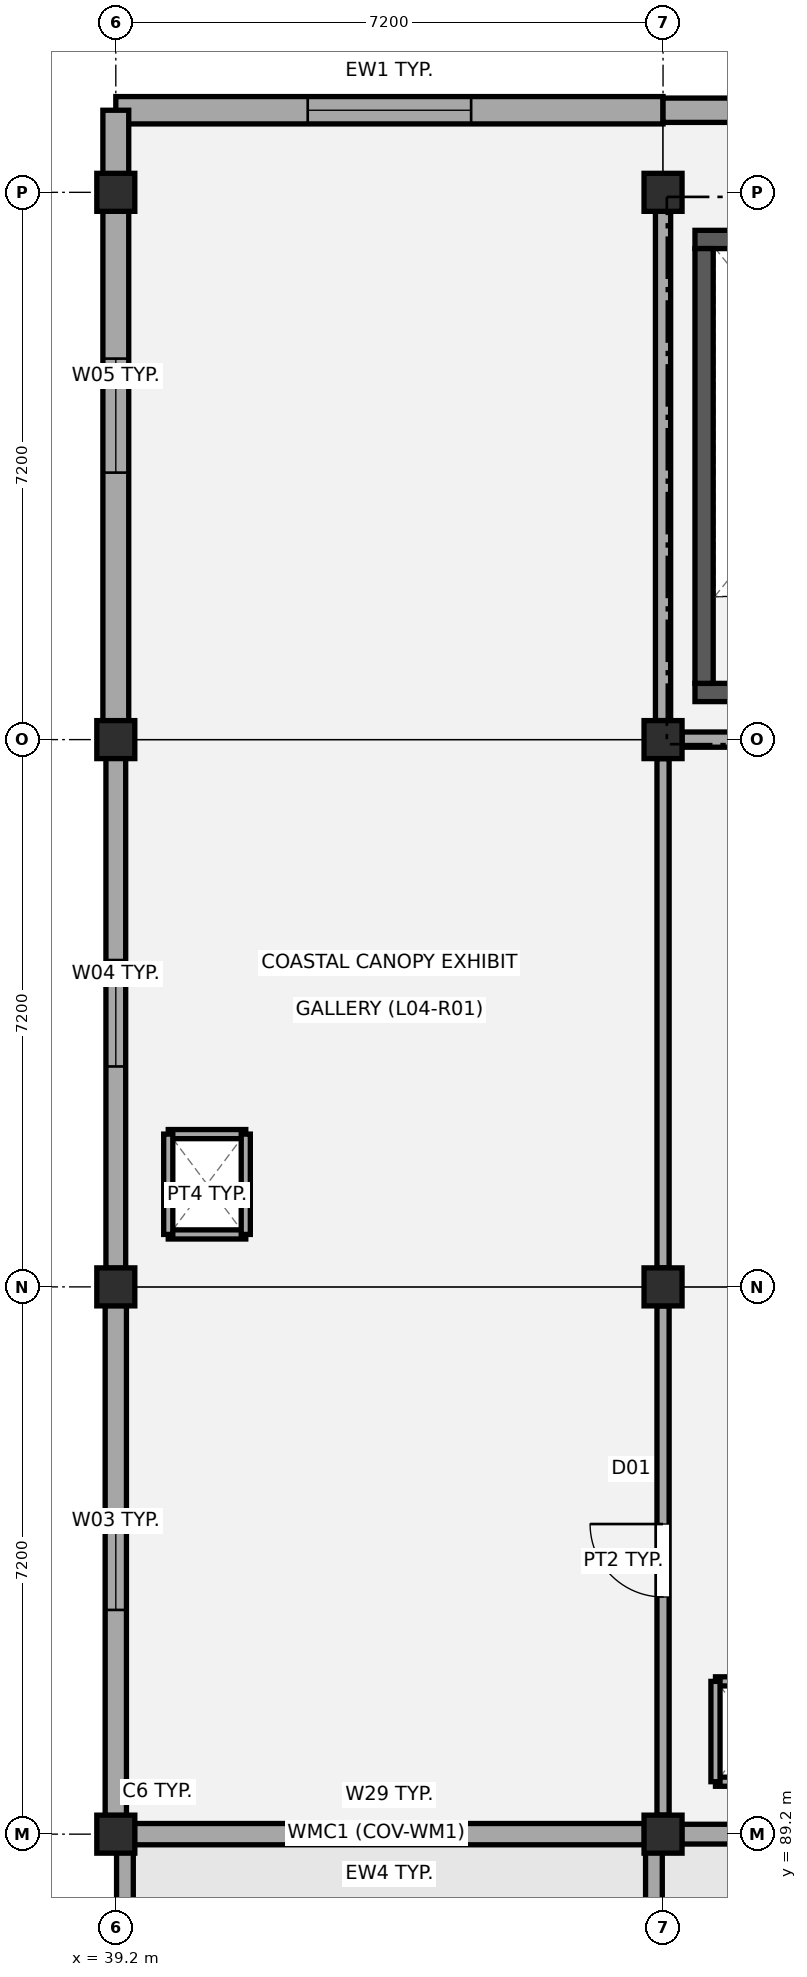
"""IFC4 building model, lengths in metres.
Left out: names, types, materials, properties, quantities, classifications, styles, units other than length and angle.
Written with IfcOpenShell. Run it as: python <this file> out.ifc"""

import sys

from ifc_helpers import new_model, si_unit, direction, frame, frame_2d, origin, origin_2d, place, context, subcontext, project, spatial, rectangle, extrude, element, fill, save


model = new_model("IFC4")
c1 = context("Model", 3, precision=1e-05, world=origin(), true_north=direction((0.0, 1.0)))
c2 = subcontext(c1, "Body", "Model", "MODEL_VIEW")
j1 = project(units=[si_unit("LENGTHUNIT", "METRE"), si_unit("PLANEANGLEUNIT", "RADIAN")], contexts=[c1])
p1 = place(None, origin())
s1 = spatial("IfcSite", under=j1, at=p1, CompositionType="ELEMENT")
p2 = place(p1, origin())
s2 = spatial("IfcBuilding", under=s1, at=p2, CompositionType="ELEMENT")
p3 = place(p2, frame((0.0, 0.0, 17.64)))
s3 = spatial("IfcBuildingStorey", under=s2, at=p3, CompositionType="ELEMENT", Elevation=17.64)
for number, where, z_axis, x_axis in (
    (1, (39.2, 89.2, 0.0), (0.0, 0.0, 1.0), (1.0, 0.0, 0.0)),
    (2, (39.2, 96.4, 0.0), (0.0, 0.0, 1.0), (1.0, 0.0, 0.0)),
    (3, (39.2, 103.6, 0.0), (0.0, 0.0, 1.0), (1.0, 0.0, 0.0)),
    (4, (39.2, 110.8, 0.0), (0.0, 0.0, 1.0), (1.0, 0.0, 0.0)),
    (5, (46.4, 89.2, 0.0), (0.0, 0.0, 1.0), (1.0, 0.0, 0.0)),
    (6, (46.4, 96.4, 0.0), (0.0, 0.0, 1.0), (1.0, 0.0, 0.0)),
    (7, (46.4, 103.6, 0.0), (0.0, 0.0, 1.0), (1.0, 0.0, 0.0)),
    (8, (46.4, 110.8, 0.0), (0.0, 0.0, 1.0), (1.0, 0.0, 0.0)),
):
    element("IfcColumn", number, at=place(p3, frame(where, z_axis=z_axis, x_axis=x_axis)), inside=s3, PredefinedType="COLUMN", context=c2, shape_type="SweptSolid", body=[
        extrude(rectangle(XDim=0.5, YDim=0.5, at=origin_2d()), origin(), (0.0, 0.0, 1.0), 3.96),
    ])
p4 = place(p3, frame((46.155, 89.2, 0.0), z_axis=(0.0, 0.0, 1.0), x_axis=(-1.0, 0.0, 0.0)))
e9 = element("IfcWall", 9, at=p4, inside=s3, PredefinedType="STANDARD", context=c2, shape_type="SweptSolid", body=[
    extrude(rectangle(XDim=6.71, YDim=0.28, at=frame_2d((3.355, 0.0))), origin(), (0.0, 0.0, 1.0), 3.08),
])
p5 = place(p4, frame((2.38, 0.0, 0.95)))
e10 = element("IfcOpeningElement", 10, at=p5, cuts=e9, PredefinedType="OPENING", context=c2, shape_type="SweptSolid", body=[
    extrude(rectangle(XDim=1.95, YDim=1.35, at=frame_2d((0.975, 0.675))), frame((0.0, 0.15, 0.0), z_axis=(0.0, -1.0, 0.0), x_axis=(1.0, 0.0, 0.0)), (0.0, 0.0, 1.0), 0.3),
])
p6 = place(p3, frame((39.2, 111.88, 0.0), z_axis=(0.0, 0.0, 1.0), x_axis=(1.0, 0.0, 0.0)))
e11 = element("IfcWall", 11, at=p6, inside=s3, PredefinedType="STANDARD", context=c2, shape_type="SweptSolid", body=[
    extrude(rectangle(XDim=7.2, YDim=0.36, at=frame_2d((3.6, 0.0))), origin(), (0.0, 0.0, 1.0), 3.63),
])
p7 = place(p6, frame((2.525, 0.0, 0.95)))
e12 = element("IfcOpeningElement", 12, at=p7, cuts=e11, PredefinedType="OPENING", context=c2, shape_type="SweptSolid", body=[
    extrude(rectangle(XDim=2.15, YDim=1.4, at=frame_2d((1.075, 0.7))), frame((0.0, 0.19, 0.0), z_axis=(0.0, -1.0, 0.0), x_axis=(1.0, 0.0, 0.0)), (0.0, 0.0, 1.0), 0.38),
])
p8 = place(p3, frame((53.355, 89.2, 0.0), z_axis=(0.0, 0.0, 1.0), x_axis=(-1.0, 0.0, 0.0)))
e13 = element("IfcWall", 13, at=p8, inside=s3, PredefinedType="STANDARD", context=c2, shape_type="SweptSolid", body=[
    extrude(rectangle(XDim=6.71, YDim=0.26, at=frame_2d((3.355, 0.0))), origin(), (0.0, 0.0, 1.0), 3.08),
])
p9 = place(p8, frame((2.18, 0.0, 0.95)))
e14 = element("IfcOpeningElement", 14, at=p9, cuts=e13, PredefinedType="OPENING", context=c2, shape_type="SweptSolid", body=[
    extrude(rectangle(XDim=2.35, YDim=1.45, at=frame_2d((1.175, 0.725))), frame((0.0, 0.14, 0.0), z_axis=(0.0, -1.0, 0.0), x_axis=(1.0, 0.0, 0.0)), (0.0, 0.0, 1.0), 0.28),
])
p10 = place(p3, frame((46.4, 111.88, 0.0), z_axis=(0.0, 0.0, 1.0), x_axis=(1.0, 0.0, 0.0)))
e15 = element("IfcWall", 15, at=p10, inside=s3, PredefinedType="STANDARD", context=c2, shape_type="SweptSolid", body=[
    extrude(rectangle(XDim=7.2, YDim=0.32, at=frame_2d((3.6, 0.0))), origin(), (0.0, 0.0, 1.0), 3.63),
])
p11 = place(p3, frame((39.2, 89.445, 0.0), z_axis=(0.0, 0.0, 1.0), x_axis=(0.0, 1.0, 0.0)))
e16 = element("IfcWall", 16, at=p11, inside=s3, PredefinedType="STANDARD", context=c2, shape_type="SweptSolid", body=[
    extrude(rectangle(XDim=6.71, YDim=0.28, at=frame_2d((3.355, 0.0))), origin(), (0.0, 0.0, 1.0), 3.08),
])
p12 = place(p11, frame((2.705, 0.0, 0.95)))
e17 = element("IfcOpeningElement", 17, at=p12, cuts=e16, PredefinedType="OPENING", context=c2, shape_type="SweptSolid", body=[
    extrude(rectangle(XDim=1.3, YDim=1.55, at=frame_2d((0.65, 0.775))), frame((0.0, 0.15, 0.0), z_axis=(0.0, -1.0, 0.0), x_axis=(1.0, 0.0, 0.0)), (0.0, 0.0, 1.0), 0.3),
])
p13 = place(p3, frame((39.2, 96.645, 0.0), z_axis=(0.0, 0.0, 1.0), x_axis=(0.0, 1.0, 0.0)))
e18 = element("IfcWall", 18, at=p13, inside=s3, PredefinedType="STANDARD", context=c2, shape_type="SweptSolid", body=[
    extrude(rectangle(XDim=6.71, YDim=0.26, at=frame_2d((3.355, 0.0))), origin(), (0.0, 0.0, 1.0), 3.08),
])
p14 = place(p13, frame((2.655, 0.0, 0.95)))
e19 = element("IfcOpeningElement", 19, at=p14, cuts=e18, PredefinedType="OPENING", context=c2, shape_type="SweptSolid", body=[
    extrude(rectangle(XDim=1.4, YDim=1.6, at=frame_2d((0.7, 0.8))), frame((0.0, 0.14, 0.0), z_axis=(0.0, -1.0, 0.0), x_axis=(1.0, 0.0, 0.0)), (0.0, 0.0, 1.0), 0.28),
])
p15 = place(p3, frame((39.2, 103.845, 0.0), z_axis=(0.0, 0.0, 1.0), x_axis=(0.0, 1.0, 0.0)))
e20 = element("IfcWall", 20, at=p15, inside=s3, PredefinedType="STANDARD", context=c2, shape_type="SweptSolid", body=[
    extrude(rectangle(XDim=8.035, YDim=0.34, at=frame_2d((4.018, 0.0))), origin(), (0.0, 0.0, 1.0), 3.08),
])
p16 = place(p15, frame((3.268, 0.0, 0.95)))
e21 = element("IfcOpeningElement", 21, at=p16, cuts=e20, PredefinedType="OPENING", context=c2, shape_type="SweptSolid", body=[
    extrude(rectangle(XDim=1.5, YDim=1.65, at=frame_2d((0.75, 0.825))), frame((0.0, 0.18, 0.0), z_axis=(0.0, -1.0, 0.0), x_axis=(1.0, 0.0, 0.0)), (0.0, 0.0, 1.0), 0.36),
])
for number, where, z_axis, x_axis in (
    (22, (39.32, 82.0, 0.0), (0.0, 0.0, 1.0), (0.0, 1.0, 0.0)),
    (23, (46.28, 82.0, 0.0), (0.0, 0.0, 1.0), (0.0, 1.0, 0.0)),
):
    element("IfcWall", number, at=place(p3, frame(where, z_axis=z_axis, x_axis=x_axis)), inside=s3, PredefinedType="PARAPET", context=c2, shape_type="SweptSolid", body=[
        extrude(rectangle(XDim=7.2, YDim=0.22, at=frame_2d((3.6, 0.0))), origin(), (0.0, 0.0, 1.0), 0.72),
    ])
for number, where, z_axis, x_axis in (
    (24, (46.82, 104.22, 0.0), (0.0, 0.0, 1.0), (1.0, 0.0, 0.0)),
    (25, (46.82, 110.18, 0.0), (0.0, 0.0, 1.0), (1.0, 0.0, 0.0)),
):
    element("IfcWall", number, at=place(p3, frame(where, z_axis=z_axis, x_axis=x_axis)), inside=s3, PredefinedType="SHEAR", context=c2, shape_type="SweptSolid", body=[
        extrude(rectangle(XDim=4.24, YDim=0.24, at=frame_2d((2.12, 0.0))), origin(), (0.0, 0.0, 1.0), 3.64),
    ])
p17 = place(p3, frame((46.94, 104.34, 0.0), z_axis=(0.0, 0.0, 1.0), x_axis=(0.0, 1.0, 0.0)))
e26 = element("IfcWall", 26, at=p17, inside=s3, PredefinedType="SHEAR", context=c2, shape_type="SweptSolid", body=[
    extrude(rectangle(XDim=5.72, YDim=0.24, at=frame_2d((2.86, 0.0))), origin(), (0.0, 0.0, 1.0), 3.64),
])
p18 = place(p3, frame((46.4, 103.85, 0.0), z_axis=(0.0, 0.0, 1.0), x_axis=(0.0, 1.0, 0.0)))
e27 = element("IfcWall", 27, at=p18, inside=s3, PredefinedType="PARTITIONING", context=c2, shape_type="SweptSolid", body=[
    extrude(rectangle(XDim=6.7, YDim=0.2, at=frame_2d((3.35, 0.0))), origin(), (0.0, 0.0, 1.0), 2.98),
])
p19 = place(p3, frame((46.65, 103.6, 0.0), z_axis=(0.0, 0.0, 1.0), x_axis=(1.0, 0.0, 0.0)))
e28 = element("IfcWall", 28, at=p19, inside=s3, PredefinedType="PARTITIONING", context=c2, shape_type="SweptSolid", body=[
    extrude(rectangle(XDim=4.29, YDim=0.2, at=frame_2d((2.145, 0.0))), origin(), (0.0, 0.0, 1.0), 2.98),
])
for number, where, z_axis, x_axis in (
    (29, (39.89, 97.09, 0.0), (0.0, 0.0, 1.0), (1.0, 0.0, 0.0)),
    (30, (39.89, 98.41, 0.0), (0.0, 0.0, 1.0), (1.0, 0.0, 0.0)),
):
    element("IfcWall", number, at=place(p3, frame(where, z_axis=z_axis, x_axis=x_axis)), inside=s3, PredefinedType="PARTITIONING", context=c2, shape_type="SweptSolid", body=[
        extrude(rectangle(XDim=1.02, YDim=0.12, at=frame_2d((0.51, 0.0))), origin(), (0.0, 0.0, 1.0), 3.62),
    ])
for number, where, z_axis, x_axis in (
    (31, (39.89, 97.09, 0.0), (0.0, 0.0, 1.0), (0.0, 1.0, 0.0)),
    (32, (40.91, 97.09, 0.0), (0.0, 0.0, 1.0), (0.0, 1.0, 0.0)),
):
    element("IfcWall", number, at=place(p3, frame(where, z_axis=z_axis, x_axis=x_axis)), inside=s3, PredefinedType="PARTITIONING", context=c2, shape_type="SweptSolid", body=[
        extrude(rectangle(XDim=1.32, YDim=0.12, at=frame_2d((0.66, 0.0))), origin(), (0.0, 0.0, 1.0), 3.62),
    ])
for number, where, z_axis, x_axis in (
    (33, (47.09, 89.89, 0.0), (0.0, 0.0, 1.0), (1.0, 0.0, 0.0)),
    (34, (47.09, 91.21, 0.0), (0.0, 0.0, 1.0), (1.0, 0.0, 0.0)),
):
    element("IfcWall", number, at=place(p3, frame(where, z_axis=z_axis, x_axis=x_axis)), inside=s3, PredefinedType="PARTITIONING", context=c2, shape_type="SweptSolid", body=[
        extrude(rectangle(XDim=1.02, YDim=0.12, at=frame_2d((0.51, 0.0))), origin(), (0.0, 0.0, 1.0), 3.62),
    ])
p20 = place(p3, frame((47.09, 89.89, 0.0), z_axis=(0.0, 0.0, 1.0), x_axis=(0.0, 1.0, 0.0)))
e35 = element("IfcWall", 35, at=p20, inside=s3, PredefinedType="PARTITIONING", context=c2, shape_type="SweptSolid", body=[
    extrude(rectangle(XDim=1.32, YDim=0.12, at=frame_2d((0.66, 0.0))), origin(), (0.0, 0.0, 1.0), 3.62),
])
p21 = place(p3, frame((46.4, 89.45, 0.0), z_axis=(0.0, 0.0, 1.0), x_axis=(0.0, 1.0, 0.0)))
e36 = element("IfcWall", 36, at=p21, inside=s3, PredefinedType="PARTITIONING", context=c2, shape_type="SweptSolid", body=[
    extrude(rectangle(XDim=6.7, YDim=0.16, at=frame_2d((3.35, 0.0))), origin(), (0.0, 0.0, 1.0), 2.98),
])
p22 = place(p21, frame((2.87, 0.0, 0.0)))
e37 = element("IfcOpeningElement", 37, at=p22, cuts=e36, PredefinedType="OPENING", context=c2, shape_type="SweptSolid", body=[
    extrude(rectangle(XDim=0.96, YDim=2.1, at=frame_2d((0.48, 1.05))), frame((0.0, 0.09, 0.0), z_axis=(0.0, -1.0, 0.0), x_axis=(1.0, 0.0, 0.0)), (0.0, 0.0, 1.0), 0.18),
])
p23 = place(p3, frame((46.4, 96.65, 0.0), z_axis=(0.0, 0.0, 1.0), x_axis=(0.0, 1.0, 0.0)))
e38 = element("IfcWall", 38, at=p23, inside=s3, PredefinedType="PARTITIONING", context=c2, shape_type="SweptSolid", body=[
    extrude(rectangle(XDim=6.7, YDim=0.16, at=frame_2d((3.35, 0.0))), origin(), (0.0, 0.0, 1.0), 3.03),
])
p24 = place(p5, origin())
e39 = element("IfcWindow", 39, at=p24, inside=s3, PartitioningType="SINGLE_PANEL", PredefinedType="WINDOW", context=c2, shape_type="SweptSolid", body=[
    extrude(rectangle(XDim=1.95, YDim=1.35, at=frame_2d((0.975, 0.675))), frame((0.0, 0.03, 0.0), z_axis=(0.0, -1.0, 0.0), x_axis=(1.0, 0.0, 0.0)), (0.0, 0.0, 1.0), 0.06),
])
fill(e10, e39)
p25 = place(p7, origin())
e40 = element("IfcWindow", 40, at=p25, inside=s3, PartitioningType="SINGLE_PANEL", PredefinedType="WINDOW", context=c2, shape_type="SweptSolid", body=[
    extrude(rectangle(XDim=2.15, YDim=1.4, at=frame_2d((1.075, 0.7))), frame((0.0, 0.03, 0.0), z_axis=(0.0, -1.0, 0.0), x_axis=(1.0, 0.0, 0.0)), (0.0, 0.0, 1.0), 0.06),
])
fill(e12, e40)
p26 = place(p12, origin())
e41 = element("IfcWindow", 41, at=p26, inside=s3, PartitioningType="SINGLE_PANEL", PredefinedType="WINDOW", context=c2, shape_type="SweptSolid", body=[
    extrude(rectangle(XDim=1.3, YDim=1.55, at=frame_2d((0.65, 0.775))), frame((0.0, 0.03, 0.0), z_axis=(0.0, -1.0, 0.0), x_axis=(1.0, 0.0, 0.0)), (0.0, 0.0, 1.0), 0.06),
])
fill(e17, e41)
p27 = place(p14, origin())
e42 = element("IfcWindow", 42, at=p27, inside=s3, PartitioningType="SINGLE_PANEL", PredefinedType="WINDOW", context=c2, shape_type="SweptSolid", body=[
    extrude(rectangle(XDim=1.4, YDim=1.6, at=frame_2d((0.7, 0.8))), frame((0.0, 0.03, 0.0), z_axis=(0.0, -1.0, 0.0), x_axis=(1.0, 0.0, 0.0)), (0.0, 0.0, 1.0), 0.06),
])
fill(e19, e42)
p28 = place(p16, origin())
e43 = element("IfcWindow", 43, at=p28, inside=s3, PartitioningType="SINGLE_PANEL", PredefinedType="WINDOW", context=c2, shape_type="SweptSolid", body=[
    extrude(rectangle(XDim=1.5, YDim=1.65, at=frame_2d((0.75, 0.825))), frame((0.0, 0.03, 0.0), z_axis=(0.0, -1.0, 0.0), x_axis=(1.0, 0.0, 0.0)), (0.0, 0.0, 1.0), 0.06),
])
fill(e21, e43)
p29 = place(p22, origin())
e44 = element("IfcDoor", 44, at=p29, inside=s3, OperationType="SINGLE_SWING_RIGHT", PredefinedType="DOOR", context=c2, shape_type="SweptSolid", body=[
    extrude(rectangle(XDim=0.96, YDim=2.1, at=frame_2d((0.48, 1.05))), frame((0.0, 0.025, 0.0), z_axis=(0.0, -1.0, 0.0), x_axis=(1.0, 0.0, 0.0)), (0.0, 0.0, 1.0), 0.05),
])
fill(e37, e44)
save(model, sys.argv[1])
